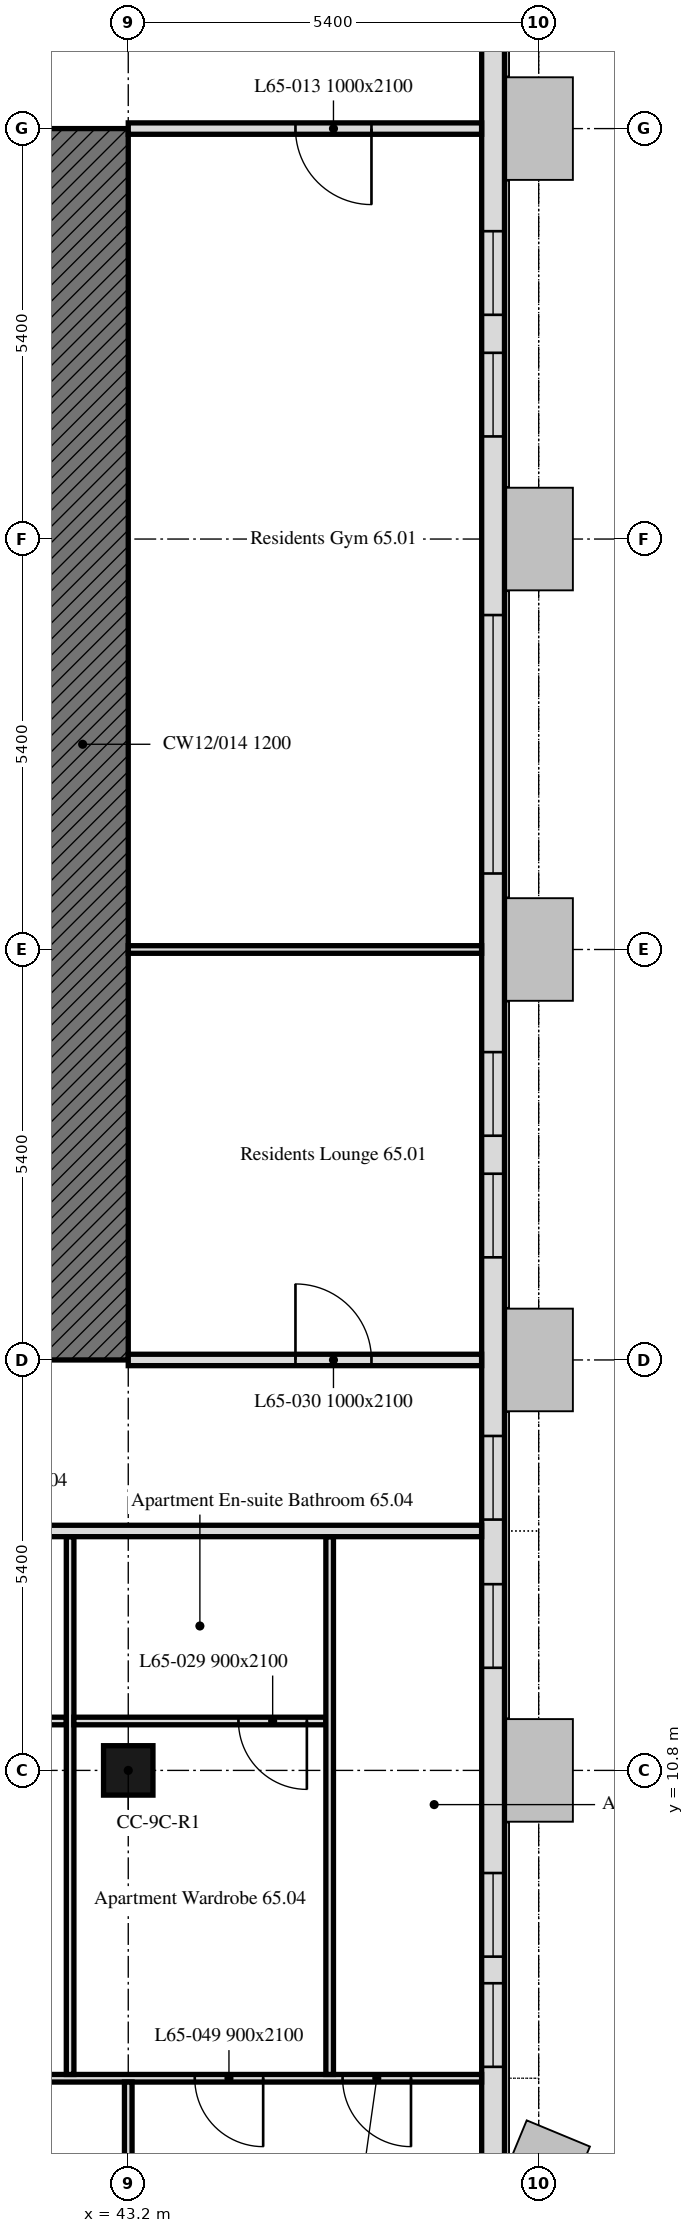
"""IFC4 building model, lengths in metres.
Left out: names, types, materials, properties, quantities, classifications, styles, units other than length and angle.
Written with IfcOpenShell. Run it as: python <this file> out.ifc"""

import sys

from ifc_helpers import new_model, si_unit, direction, frame, frame_2d, origin, origin_2d, place, context, subcontext, project, spatial, rectangle, extrude, element, fill, save


model = new_model("IFC4")
c1 = context("Model", 3, precision=1e-05, world=origin(), true_north=direction((0.0, 1.0)))
c2 = subcontext(c1, "Body", "Model", "MODEL_VIEW")
j1 = project(units=[si_unit("LENGTHUNIT", "METRE"), si_unit("PLANEANGLEUNIT", "RADIAN")], contexts=[c1])
p1 = place(None, origin())
s1 = spatial("IfcSite", under=j1, at=p1, CompositionType="ELEMENT")
p2 = place(p1, origin())
s2 = spatial("IfcBuilding", under=s1, at=p2, CompositionType="ELEMENT")
p3 = place(p2, frame((0.0, 0.0, 268.6)))
s3 = spatial("IfcBuildingStorey", under=s2, at=p3, CompositionType="ELEMENT", Elevation=268.6)
p4 = place(p3, frame((43.2, 10.8, 0.0), z_axis=(0.0, 0.0, 1.0), x_axis=(1.0, 0.0, 0.0)))
e1 = element("IfcColumn", 1, at=p4, inside=s3, PredefinedType="COLUMN", context=c2, shape_type="SweptSolid", body=[
    extrude(rectangle(XDim=0.65, YDim=0.65, at=origin_2d()), origin(), (0.0, 0.0, 1.0), 3.0),
])
p5 = place(p3, frame((48.0, 5.586, 0.0), z_axis=(0.0, 0.0, 1.0), x_axis=(0.0, 1.0, 0.0)))
e2 = element("IfcWall", 2, at=p5, inside=s3, PredefinedType="SOLIDWALL", context=c2, shape_type="SweptSolid", body=[
    extrude(rectangle(XDim=32.027, YDim=0.3, at=frame_2d((16.014, 0.0))), origin(), (0.0, 0.0, 1.0), 3.0),
])
p6 = place(p5, frame((1.314, 0.0, 0.9)))
e3 = element("IfcOpeningElement", 3, at=p6, cuts=e2, PredefinedType="OPENING", context=c2, shape_type="SweptSolid", body=[
    extrude(rectangle(XDim=1.1, YDim=1.7, at=frame_2d((0.55, 0.85))), frame((0.0, 0.16, 0.0), z_axis=(0.0, -1.0, 0.0), x_axis=(1.0, 0.0, 0.0)), (0.0, 0.0, 1.0), 0.32),
])
p7 = place(p5, frame((2.764, 0.0, 0.9)))
e4 = element("IfcOpeningElement", 4, at=p7, cuts=e2, PredefinedType="OPENING", context=c2, shape_type="SweptSolid", body=[
    extrude(rectangle(XDim=1.1, YDim=1.7, at=frame_2d((0.55, 0.85))), frame((0.0, 0.16, 0.0), z_axis=(0.0, -1.0, 0.0), x_axis=(1.0, 0.0, 0.0)), (0.0, 0.0, 1.0), 0.32),
])
p8 = place(p5, frame((6.564, 0.0, 0.9)))
e5 = element("IfcOpeningElement", 5, at=p8, cuts=e2, PredefinedType="OPENING", context=c2, shape_type="SweptSolid", body=[
    extrude(rectangle(XDim=1.1, YDim=1.7, at=frame_2d((0.55, 0.85))), frame((0.0, 0.16, 0.0), z_axis=(0.0, -1.0, 0.0), x_axis=(1.0, 0.0, 0.0)), (0.0, 0.0, 1.0), 0.32),
])
p9 = place(p5, frame((8.514, 0.0, 0.9)))
e6 = element("IfcOpeningElement", 6, at=p9, cuts=e2, PredefinedType="OPENING", context=c2, shape_type="SweptSolid", body=[
    extrude(rectangle(XDim=1.1, YDim=1.7, at=frame_2d((0.55, 0.85))), frame((0.0, 0.16, 0.0), z_axis=(0.0, -1.0, 0.0), x_axis=(1.0, 0.0, 0.0)), (0.0, 0.0, 1.0), 0.32),
])
p10 = place(p5, frame((11.964, 0.0, 0.9)))
e7 = element("IfcOpeningElement", 7, at=p10, cuts=e2, PredefinedType="OPENING", context=c2, shape_type="SweptSolid", body=[
    extrude(rectangle(XDim=1.1, YDim=1.7, at=frame_2d((0.55, 0.85))), frame((0.0, 0.16, 0.0), z_axis=(0.0, -1.0, 0.0), x_axis=(1.0, 0.0, 0.0)), (0.0, 0.0, 1.0), 0.32),
])
p11 = place(p5, frame((13.564, 0.0, 0.9)))
e8 = element("IfcOpeningElement", 8, at=p11, cuts=e2, PredefinedType="OPENING", context=c2, shape_type="SweptSolid", body=[
    extrude(rectangle(XDim=1.1, YDim=1.7, at=frame_2d((0.55, 0.85))), frame((0.0, 0.16, 0.0), z_axis=(0.0, -1.0, 0.0), x_axis=(1.0, 0.0, 0.0)), (0.0, 0.0, 1.0), 0.32),
])
p12 = place(p5, frame((17.014, 0.0, 0.9)))
e9 = element("IfcOpeningElement", 9, at=p12, cuts=e2, PredefinedType="OPENING", context=c2, shape_type="SweptSolid", body=[
    extrude(rectangle(XDim=3.4, YDim=1.7, at=frame_2d((1.7, 0.85))), frame((0.0, 0.16, 0.0), z_axis=(0.0, -1.0, 0.0), x_axis=(1.0, 0.0, 0.0)), (0.0, 0.0, 1.0), 0.32),
])
p13 = place(p5, frame((22.764, 0.0, 0.9)))
e10 = element("IfcOpeningElement", 10, at=p13, cuts=e2, PredefinedType="OPENING", context=c2, shape_type="SweptSolid", body=[
    extrude(rectangle(XDim=1.1, YDim=1.7, at=frame_2d((0.55, 0.85))), frame((0.0, 0.16, 0.0), z_axis=(0.0, -1.0, 0.0), x_axis=(1.0, 0.0, 0.0)), (0.0, 0.0, 1.0), 0.32),
])
p14 = place(p5, frame((24.364, 0.0, 0.9)))
e11 = element("IfcOpeningElement", 11, at=p14, cuts=e2, PredefinedType="OPENING", context=c2, shape_type="SweptSolid", body=[
    extrude(rectangle(XDim=1.1, YDim=1.7, at=frame_2d((0.55, 0.85))), frame((0.0, 0.16, 0.0), z_axis=(0.0, -1.0, 0.0), x_axis=(1.0, 0.0, 0.0)), (0.0, 0.0, 1.0), 0.32),
])
p15 = place(p5, frame((28.239, 0.0, 0.9)))
e12 = element("IfcOpeningElement", 12, at=p15, cuts=e2, PredefinedType="OPENING", context=c2, shape_type="SweptSolid", body=[
    extrude(rectangle(XDim=0.65, YDim=1.7, at=frame_2d((0.325, 0.85))), frame((0.0, 0.16, 0.0), z_axis=(0.0, -1.0, 0.0), x_axis=(1.0, 0.0, 0.0)), (0.0, 0.0, 1.0), 0.32),
])
p16 = place(p5, frame((29.764, 0.0, 0.9)))
e13 = element("IfcOpeningElement", 13, at=p16, cuts=e2, PredefinedType="OPENING", context=c2, shape_type="SweptSolid", body=[
    extrude(rectangle(XDim=1.1, YDim=1.7, at=frame_2d((0.55, 0.85))), frame((0.0, 0.16, 0.0), z_axis=(0.0, -1.0, 0.0), x_axis=(1.0, 0.0, 0.0)), (0.0, 0.0, 1.0), 0.32),
])
p17 = place(p3, frame((42.6, 32.4, 0.0), z_axis=(0.0, 0.0, 1.0), x_axis=(0.0, -1.0, 0.0)))
e14 = element("IfcWall", 14, at=p17, inside=s3, PredefinedType="SOLIDWALL", context=c2, shape_type="SweptSolid", body=[
    extrude(rectangle(XDim=16.2, YDim=1.2, at=frame_2d((8.1, 0.0))), origin(), (0.0, 0.0, 1.0), 3.0),
])
p18 = place(p3, frame((47.849, 32.4, 0.0), z_axis=(0.0, 0.0, 1.0), x_axis=(-1.0, 0.0, 0.0)))
e15 = element("IfcWall", 15, at=p18, inside=s3, PredefinedType="PARTITIONING", context=c2, shape_type="SweptSolid", body=[
    extrude(rectangle(XDim=4.649, YDim=0.15, at=frame_2d((2.325, 0.0))), origin(), (0.0, 0.0, 1.0), 2.4),
])
p19 = place(p18, frame((1.449, 0.0, 0.0)))
e16 = element("IfcOpeningElement", 16, at=p19, cuts=e15, PredefinedType="OPENING", context=c2, shape_type="SweptSolid", body=[
    extrude(rectangle(XDim=1.0, YDim=2.1, at=frame_2d((0.5, 1.05))), frame((0.0, 0.075, 0.0), z_axis=(0.0, -1.0, 0.0), x_axis=(1.0, 0.0, 0.0)), (0.0, 0.0, 1.0), 0.15),
])
p20 = place(p3, frame((43.2, 21.6, 0.0), z_axis=(0.0, 0.0, 1.0), x_axis=(1.0, 0.0, 0.0)))
e17 = element("IfcWall", 17, at=p20, inside=s3, PredefinedType="PARTITIONING", context=c2, shape_type="SweptSolid", body=[
    extrude(rectangle(XDim=4.649, YDim=0.1, at=frame_2d((2.325, 0.0))), origin(), (0.0, 0.0, 1.0), 2.4),
])
p21 = place(p3, frame((47.849, 6.75, 0.0), z_axis=(0.0, 0.0, 1.0), x_axis=(-1.0, 0.0, 0.0)))
e18 = element("IfcWall", 18, at=p21, inside=s3, PredefinedType="PARTITIONING", context=c2, shape_type="SweptSolid", body=[
    extrude(rectangle(XDim=15.374, YDim=0.1, at=frame_2d((7.687, 0.0))), origin(), (0.0, 0.0, 1.0), 2.4),
])
p22 = place(p21, frame((0.929, 0.0, 0.0)))
e19 = element("IfcOpeningElement", 19, at=p22, cuts=e18, PredefinedType="OPENING", context=c2, shape_type="SweptSolid", body=[
    extrude(rectangle(XDim=0.9, YDim=2.1, at=frame_2d((0.45, 1.05))), frame((0.0, 0.05, 0.0), z_axis=(0.0, -1.0, 0.0), x_axis=(1.0, 0.0, 0.0)), (0.0, 0.0, 1.0), 0.1),
])
p23 = place(p21, frame((13.149, 0.0, 0.0)))
e20 = element("IfcOpeningElement", 20, at=p23, cuts=e18, PredefinedType="OPENING", context=c2, shape_type="SweptSolid", body=[
    extrude(rectangle(XDim=0.9, YDim=2.1, at=frame_2d((0.45, 1.05))), frame((0.0, 0.05, 0.0), z_axis=(0.0, -1.0, 0.0), x_axis=(1.0, 0.0, 0.0)), (0.0, 0.0, 1.0), 0.1),
])
p24 = place(p21, frame((2.874, 0.0, 0.0)))
e21 = element("IfcOpeningElement", 21, at=p24, cuts=e18, PredefinedType="OPENING", context=c2, shape_type="SweptSolid", body=[
    extrude(rectangle(XDim=0.9, YDim=2.1, at=frame_2d((0.45, 1.05))), frame((0.0, 0.05, 0.0), z_axis=(0.0, -1.0, 0.0), x_axis=(1.0, 0.0, 0.0)), (0.0, 0.0, 1.0), 0.1),
])
p25 = place(p21, frame((8.463, 0.0, 0.0)))
e22 = element("IfcOpeningElement", 22, at=p25, cuts=e18, PredefinedType="OPENING", context=c2, shape_type="SweptSolid", body=[
    extrude(rectangle(XDim=0.9, YDim=2.1, at=frame_2d((0.45, 1.05))), frame((0.0, 0.05, 0.0), z_axis=(0.0, -1.0, 0.0), x_axis=(1.0, 0.0, 0.0)), (0.0, 0.0, 1.0), 0.1),
])
p26 = place(p3, frame((43.2, 1.112, 0.0), z_axis=(0.0, 0.0, 1.0), x_axis=(0.0, 1.0, 0.0)))
e23 = element("IfcWall", 23, at=p26, inside=s3, PredefinedType="PARTITIONING", context=c2, shape_type="SweptSolid", body=[
    extrude(rectangle(XDim=5.588, YDim=0.1, at=frame_2d((2.794, 0.0))), origin(), (0.0, 0.0, 1.0), 3.0),
])
p27 = place(p26, frame((1.813, 0.0, 0.0)))
e24 = element("IfcOpeningElement", 24, at=p27, cuts=e23, PredefinedType="OPENING", context=c2, shape_type="SweptSolid", body=[
    extrude(rectangle(XDim=0.9, YDim=2.1, at=frame_2d((0.45, 1.05))), frame((0.0, 0.05, 0.0), z_axis=(0.0, -1.0, 0.0), x_axis=(1.0, 0.0, 0.0)), (0.0, 0.0, 1.0), 0.1),
])
p28 = place(p3, frame((42.385, 11.45, 0.0), z_axis=(0.0, 0.0, 1.0), x_axis=(-1.0, 0.0, 0.0)))
e25 = element("IfcWall", 25, at=p28, inside=s3, PredefinedType="PARTITIONING", context=c2, shape_type="SweptSolid", body=[
    extrude(rectangle(XDim=2.779, YDim=0.1, at=frame_2d((1.39, 0.0))), origin(), (0.0, 0.0, 1.0), 3.0),
])
p29 = place(p3, frame((42.435, 6.8, 0.0), z_axis=(0.0, 0.0, 1.0), x_axis=(0.0, 1.0, 0.0)))
e26 = element("IfcWall", 26, at=p29, inside=s3, PredefinedType="PARTITIONING", context=c2, shape_type="SweptSolid", body=[
    extrude(rectangle(XDim=7.075, YDim=0.1, at=frame_2d((3.538, 0.0))), origin(), (0.0, 0.0, 1.0), 2.4),
])
p30 = place(p3, frame((45.8, 11.45, 0.0), z_axis=(0.0, 0.0, 1.0), x_axis=(-1.0, 0.0, 0.0)))
e27 = element("IfcWall", 27, at=p30, inside=s3, PredefinedType="PARTITIONING", context=c2, shape_type="SweptSolid", body=[
    extrude(rectangle(XDim=3.315, YDim=0.1, at=frame_2d((1.657, 0.0))), origin(), (0.0, 0.0, 1.0), 3.0),
])
p31 = place(p30, frame((0.25, 0.0, 0.0)))
e28 = element("IfcOpeningElement", 28, at=p31, cuts=e27, PredefinedType="OPENING", context=c2, shape_type="SweptSolid", body=[
    extrude(rectangle(XDim=0.9, YDim=2.1, at=frame_2d((0.45, 1.05))), frame((0.0, 0.05, 0.0), z_axis=(0.0, -1.0, 0.0), x_axis=(1.0, 0.0, 0.0)), (0.0, 0.0, 1.0), 0.1),
])
p32 = place(p3, frame((45.85, 6.8, 0.0), z_axis=(0.0, 0.0, 1.0), x_axis=(0.0, 1.0, 0.0)))
e29 = element("IfcWall", 29, at=p32, inside=s3, PredefinedType="PARTITIONING", context=c2, shape_type="SweptSolid", body=[
    extrude(rectangle(XDim=7.075, YDim=0.1, at=frame_2d((3.538, 0.0))), origin(), (0.0, 0.0, 1.0), 2.4),
])
p33 = place(p3, frame((47.849, 13.95, 0.0), z_axis=(0.0, 0.0, 1.0), x_axis=(-1.0, 0.0, 0.0)))
e30 = element("IfcWall", 30, at=p33, inside=s3, PredefinedType="PARTITIONING", context=c2, shape_type="SweptSolid", body=[
    extrude(rectangle(XDim=41.698, YDim=0.15, at=frame_2d((20.849, 0.0))), origin(), (0.0, 0.0, 1.0), 2.4),
])
p34 = place(p33, frame((37.749, 0.0, 0.0)))
e31 = element("IfcOpeningElement", 31, at=p34, cuts=e30, PredefinedType="OPENING", context=c2, shape_type="SweptSolid", body=[
    extrude(rectangle(XDim=1.0, YDim=2.1, at=frame_2d((0.5, 1.05))), frame((0.0, 0.075, 0.0), z_axis=(0.0, -1.0, 0.0), x_axis=(1.0, 0.0, 0.0)), (0.0, 0.0, 1.0), 0.15),
])
p35 = place(p33, frame((32.962, 0.0, 0.0)))
e32 = element("IfcOpeningElement", 32, at=p35, cuts=e30, PredefinedType="OPENING", context=c2, shape_type="SweptSolid", body=[
    extrude(rectangle(XDim=1.0, YDim=2.1, at=frame_2d((0.5, 1.05))), frame((0.0, 0.075, 0.0), z_axis=(0.0, -1.0, 0.0), x_axis=(1.0, 0.0, 0.0)), (0.0, 0.0, 1.0), 0.15),
])
p36 = place(p33, frame((22.179, 0.0, 0.0)))
e33 = element("IfcOpeningElement", 33, at=p36, cuts=e30, PredefinedType="OPENING", context=c2, shape_type="SweptSolid", body=[
    extrude(rectangle(XDim=1.0, YDim=2.1, at=frame_2d((0.5, 1.05))), frame((0.0, 0.075, 0.0), z_axis=(0.0, -1.0, 0.0), x_axis=(1.0, 0.0, 0.0)), (0.0, 0.0, 1.0), 0.15),
])
p37 = place(p33, frame((9.193, 0.0, 0.0)))
e34 = element("IfcOpeningElement", 34, at=p37, cuts=e30, PredefinedType="OPENING", context=c2, shape_type="SweptSolid", body=[
    extrude(rectangle(XDim=1.0, YDim=2.1, at=frame_2d((0.5, 1.05))), frame((0.0, 0.075, 0.0), z_axis=(0.0, -1.0, 0.0), x_axis=(1.0, 0.0, 0.0)), (0.0, 0.0, 1.0), 0.15),
])
p38 = place(p3, frame((43.2, 16.2, 0.0), z_axis=(0.0, 0.0, 1.0), x_axis=(1.0, 0.0, 0.0)))
e35 = element("IfcWall", 35, at=p38, inside=s3, PredefinedType="PARTITIONING", context=c2, shape_type="SweptSolid", body=[
    extrude(rectangle(XDim=4.649, YDim=0.15, at=frame_2d((2.325, 0.0))), origin(), (0.0, 0.0, 1.0), 2.4),
])
p39 = place(p38, frame((2.2, 0.0, 0.0)))
e36 = element("IfcOpeningElement", 36, at=p39, cuts=e35, PredefinedType="OPENING", context=c2, shape_type="SweptSolid", body=[
    extrude(rectangle(XDim=1.0, YDim=2.1, at=frame_2d((0.5, 1.05))), frame((0.0, 0.075, 0.0), z_axis=(0.0, -1.0, 0.0), x_axis=(1.0, 0.0, 0.0)), (0.0, 0.0, 1.0), 0.15),
])
p40 = place(p6, origin())
e37 = element("IfcWindow", 37, at=p40, inside=s3, PartitioningType="SINGLE_PANEL", PredefinedType="WINDOW", context=c2, shape_type="SweptSolid", body=[
    extrude(rectangle(XDim=1.1, YDim=1.7, at=frame_2d((0.55, 0.85))), frame((0.0, 0.03, 0.0), z_axis=(0.0, -1.0, 0.0), x_axis=(1.0, 0.0, 0.0)), (0.0, 0.0, 1.0), 0.06),
])
fill(e3, e37)
p41 = place(p7, origin())
e38 = element("IfcWindow", 38, at=p41, inside=s3, PartitioningType="SINGLE_PANEL", PredefinedType="WINDOW", context=c2, shape_type="SweptSolid", body=[
    extrude(rectangle(XDim=1.1, YDim=1.7, at=frame_2d((0.55, 0.85))), frame((0.0, 0.03, 0.0), z_axis=(0.0, -1.0, 0.0), x_axis=(1.0, 0.0, 0.0)), (0.0, 0.0, 1.0), 0.06),
])
fill(e4, e38)
p42 = place(p8, origin())
e39 = element("IfcWindow", 39, at=p42, inside=s3, PartitioningType="SINGLE_PANEL", PredefinedType="WINDOW", context=c2, shape_type="SweptSolid", body=[
    extrude(rectangle(XDim=1.1, YDim=1.7, at=frame_2d((0.55, 0.85))), frame((0.0, 0.03, 0.0), z_axis=(0.0, -1.0, 0.0), x_axis=(1.0, 0.0, 0.0)), (0.0, 0.0, 1.0), 0.06),
])
fill(e5, e39)
p43 = place(p9, origin())
e40 = element("IfcWindow", 40, at=p43, inside=s3, PartitioningType="SINGLE_PANEL", PredefinedType="WINDOW", context=c2, shape_type="SweptSolid", body=[
    extrude(rectangle(XDim=1.1, YDim=1.7, at=frame_2d((0.55, 0.85))), frame((0.0, 0.03, 0.0), z_axis=(0.0, -1.0, 0.0), x_axis=(1.0, 0.0, 0.0)), (0.0, 0.0, 1.0), 0.06),
])
fill(e6, e40)
p44 = place(p10, origin())
e41 = element("IfcWindow", 41, at=p44, inside=s3, PartitioningType="SINGLE_PANEL", PredefinedType="WINDOW", context=c2, shape_type="SweptSolid", body=[
    extrude(rectangle(XDim=1.1, YDim=1.7, at=frame_2d((0.55, 0.85))), frame((0.0, 0.03, 0.0), z_axis=(0.0, -1.0, 0.0), x_axis=(1.0, 0.0, 0.0)), (0.0, 0.0, 1.0), 0.06),
])
fill(e7, e41)
p45 = place(p11, origin())
e42 = element("IfcWindow", 42, at=p45, inside=s3, PartitioningType="SINGLE_PANEL", PredefinedType="WINDOW", context=c2, shape_type="SweptSolid", body=[
    extrude(rectangle(XDim=1.1, YDim=1.7, at=frame_2d((0.55, 0.85))), frame((0.0, 0.03, 0.0), z_axis=(0.0, -1.0, 0.0), x_axis=(1.0, 0.0, 0.0)), (0.0, 0.0, 1.0), 0.06),
])
fill(e8, e42)
p46 = place(p12, origin())
e43 = element("IfcWindow", 43, at=p46, inside=s3, PartitioningType="SINGLE_PANEL", PredefinedType="WINDOW", context=c2, shape_type="SweptSolid", body=[
    extrude(rectangle(XDim=3.4, YDim=1.7, at=frame_2d((1.7, 0.85))), frame((0.0, 0.03, 0.0), z_axis=(0.0, -1.0, 0.0), x_axis=(1.0, 0.0, 0.0)), (0.0, 0.0, 1.0), 0.06),
])
fill(e9, e43)
p47 = place(p13, origin())
e44 = element("IfcWindow", 44, at=p47, inside=s3, PartitioningType="SINGLE_PANEL", PredefinedType="WINDOW", context=c2, shape_type="SweptSolid", body=[
    extrude(rectangle(XDim=1.1, YDim=1.7, at=frame_2d((0.55, 0.85))), frame((0.0, 0.03, 0.0), z_axis=(0.0, -1.0, 0.0), x_axis=(1.0, 0.0, 0.0)), (0.0, 0.0, 1.0), 0.06),
])
fill(e10, e44)
p48 = place(p14, origin())
e45 = element("IfcWindow", 45, at=p48, inside=s3, PartitioningType="SINGLE_PANEL", PredefinedType="WINDOW", context=c2, shape_type="SweptSolid", body=[
    extrude(rectangle(XDim=1.1, YDim=1.7, at=frame_2d((0.55, 0.85))), frame((0.0, 0.03, 0.0), z_axis=(0.0, -1.0, 0.0), x_axis=(1.0, 0.0, 0.0)), (0.0, 0.0, 1.0), 0.06),
])
fill(e11, e45)
p49 = place(p19, origin())
e46 = element("IfcDoor", 46, at=p49, inside=s3, OperationType="SINGLE_SWING_RIGHT", PredefinedType="DOOR", context=c2, shape_type="SweptSolid", body=[
    extrude(rectangle(XDim=1.0, YDim=2.1, at=frame_2d((0.5, 1.05))), frame((0.0, 0.025, 0.0), z_axis=(0.0, -1.0, 0.0), x_axis=(1.0, 0.0, 0.0)), (0.0, 0.0, 1.0), 0.05),
])
fill(e16, e46)
p50 = place(p22, origin())
e47 = element("IfcDoor", 47, at=p50, inside=s3, OperationType="SINGLE_SWING_RIGHT", PredefinedType="DOOR", context=c2, shape_type="SweptSolid", body=[
    extrude(rectangle(XDim=0.9, YDim=2.1, at=frame_2d((0.45, 1.05))), frame((0.0, 0.025, 0.0), z_axis=(0.0, -1.0, 0.0), x_axis=(1.0, 0.0, 0.0)), (0.0, 0.0, 1.0), 0.05),
])
fill(e19, e47)
p51 = place(p31, origin())
e48 = element("IfcDoor", 48, at=p51, inside=s3, OperationType="SINGLE_SWING_LEFT", PredefinedType="DOOR", context=c2, shape_type="SweptSolid", body=[
    extrude(rectangle(XDim=0.9, YDim=2.1, at=frame_2d((0.45, 1.05))), frame((0.0, 0.025, 0.0), z_axis=(0.0, -1.0, 0.0), x_axis=(1.0, 0.0, 0.0)), (0.0, 0.0, 1.0), 0.05),
])
fill(e28, e48)
p52 = place(p39, origin())
e49 = element("IfcDoor", 49, at=p52, inside=s3, OperationType="SINGLE_SWING_RIGHT", PredefinedType="DOOR", context=c2, shape_type="SweptSolid", body=[
    extrude(rectangle(XDim=1.0, YDim=2.1, at=frame_2d((0.5, 1.05))), frame((0.0, 0.025, 0.0), z_axis=(0.0, -1.0, 0.0), x_axis=(1.0, 0.0, 0.0)), (0.0, 0.0, 1.0), 0.05),
])
fill(e36, e49)
p53 = place(p24, origin())
e50 = element("IfcDoor", 50, at=p53, inside=s3, OperationType="SINGLE_SWING_LEFT", PredefinedType="DOOR", context=c2, shape_type="SweptSolid", body=[
    extrude(rectangle(XDim=0.9, YDim=2.1, at=frame_2d((0.45, 1.05))), frame((0.0, 0.025, 0.0), z_axis=(0.0, -1.0, 0.0), x_axis=(1.0, 0.0, 0.0)), (0.0, 0.0, 1.0), 0.05),
])
fill(e21, e50)
save(model, sys.argv[1])
